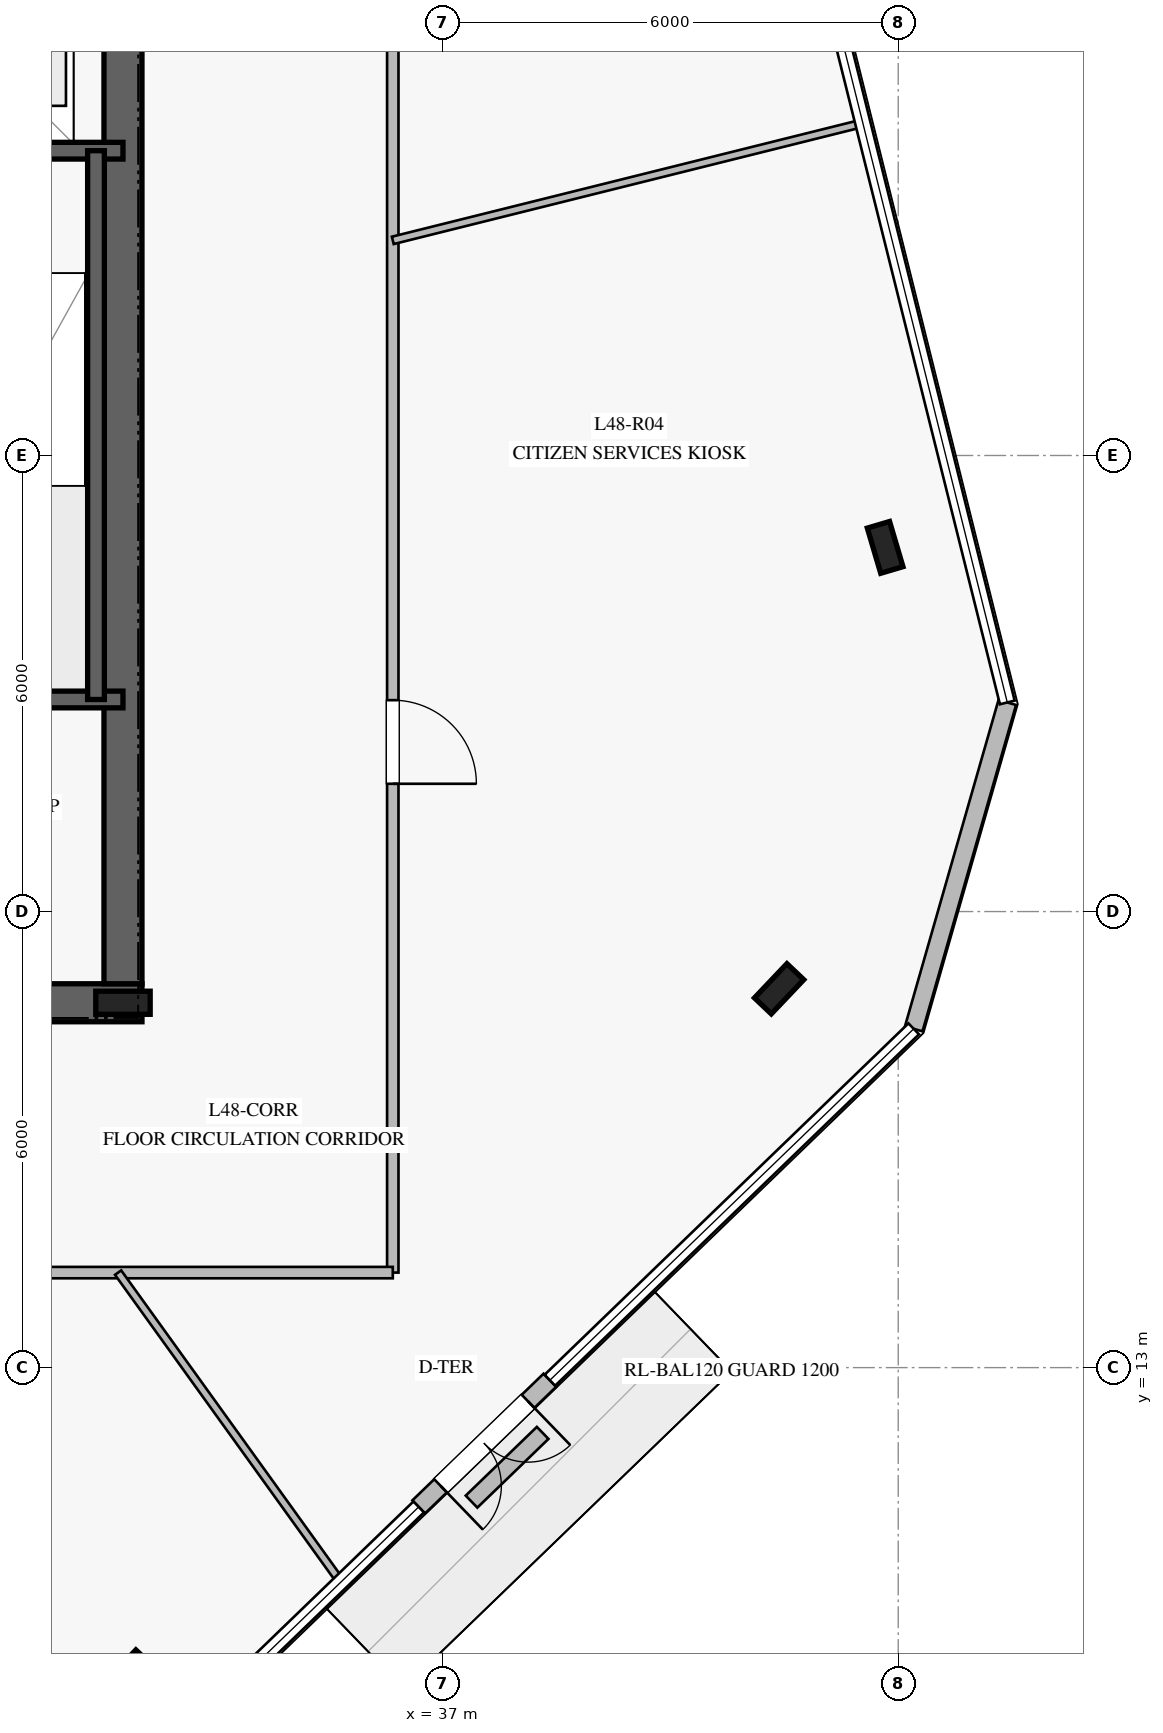
"""IFC4 building model, lengths in metres.
Left out: names, types, materials, properties, quantities, classifications, styles, units other than length and angle.
Written with IfcOpenShell. Run it as: python <this file> out.ifc"""

import sys

from ifc_helpers import new_model, si_unit, direction, frame, frame_2d, origin, origin_2d, place, context, subcontext, project, spatial, rectangle, i_section, extrude, element, fill, save


model = new_model("IFC4")
c1 = context("Model", 3, precision=1e-05, world=origin(), true_north=direction((0.0, 1.0)))
c2 = subcontext(c1, "Body", "Model", "MODEL_VIEW")
j1 = project(units=[si_unit("LENGTHUNIT", "METRE"), si_unit("PLANEANGLEUNIT", "RADIAN")], contexts=[c1])
p1 = place(None, origin())
s1 = spatial("IfcSite", under=j1, at=p1, CompositionType="ELEMENT")
p2 = place(p1, origin())
s2 = spatial("IfcBuilding", under=s1, at=p2, CompositionType="ELEMENT")
p3 = place(p2, frame((0.0, 0.0, 200.8)))
s3 = spatial("IfcBuildingStorey", under=s2, at=p3, CompositionType="ELEMENT", Elevation=200.8)
p4 = place(p3, frame((16.95, 17.8, 0.0), z_axis=(0.0, 0.0, 1.0), x_axis=(1.0, 0.0, 0.0)))
e1 = element("IfcWall", 1, at=p4, inside=s3, PredefinedType="SHEAR", context=c2, shape_type="SweptSolid", body=[
    extrude(rectangle(XDim=16.1, YDim=0.5, at=frame_2d((8.05, 0.0))), origin(), (0.0, 0.0, 1.0), 3.78),
])
p5 = place(p4, frame((5.0, 0.0, 0.0)))
e2 = element("IfcOpeningElement", 2, at=p5, cuts=e1, PredefinedType="OPENING", context=c2, shape_type="SweptSolid", body=[
    extrude(rectangle(XDim=1.2, YDim=2.25, at=frame_2d((0.6, 1.125))), frame((0.0, 0.26, 0.0), z_axis=(0.0, -1.0, 0.0), x_axis=(1.0, 0.0, 0.0)), (0.0, 0.0, 1.0), 0.52),
])
p6 = place(p4, frame((13.95, 0.0, 0.0)))
e3 = element("IfcOpeningElement", 3, at=p6, cuts=e1, PredefinedType="OPENING", context=c2, shape_type="SweptSolid", body=[
    extrude(rectangle(XDim=0.9, YDim=2.1, at=frame_2d((0.45, 1.05))), frame((0.0, 0.26, 0.0), z_axis=(0.0, -1.0, 0.0), x_axis=(1.0, 0.0, 0.0)), (0.0, 0.0, 1.0), 0.52),
])
p7 = place(p4, frame((9.825, 0.0, 0.0)))
e4 = element("IfcOpeningElement", 4, at=p7, cuts=e1, PredefinedType="OPENING", context=c2, shape_type="SweptSolid", body=[
    extrude(rectangle(XDim=1.1, YDim=2.2, at=frame_2d((0.55, 1.1))), frame((0.0, 0.26, 0.0), z_axis=(0.0, -1.0, 0.0), x_axis=(1.0, 0.0, 0.0)), (0.0, 0.0, 1.0), 0.52),
])
p8 = place(p3, frame((32.8, 18.05, 0.0), z_axis=(0.0, 0.0, 1.0), x_axis=(0.0, 1.0, 0.0)))
e5 = element("IfcWall", 5, at=p8, inside=s3, PredefinedType="SHEAR", context=c2, shape_type="SweptSolid", body=[
    extrude(rectangle(XDim=13.9, YDim=0.5, at=frame_2d((6.95, 0.0))), origin(), (0.0, 0.0, 1.0), 3.78),
])
p9 = place(p3, frame((32.8, 17.8, 0.0), z_axis=(0.0, 0.0, 1.0), x_axis=(1.0, 0.0, 0.0)))
e6 = element("IfcColumn", 6, at=p9, inside=s3, PredefinedType="COLUMN", context=c2, shape_type="SweptSolid", body=[
    extrude(i_section(OverallWidth=0.304, OverallDepth=0.716, WebThickness=0.021, FlangeThickness=0.04, at=origin_2d()), origin(), (0.0, 0.0, 1.0), 4.0),
])
for number, where, z_axis, x_axis in (
    (7, (29.08, 21.79, 0.0), (0.0, 0.0, 1.0), (1.0, 0.0, 0.0)),
    (8, (29.08, 29.01, 0.0), (0.0, 0.0, 1.0), (1.0, 0.0, 0.0)),
):
    element("IfcWall", number, at=place(p3, frame(where, z_axis=z_axis, x_axis=x_axis)), inside=s3, PredefinedType="SOLIDWALL", context=c2, shape_type="SweptSolid", body=[
        extrude(rectangle(XDim=3.72, YDim=0.22, at=frame_2d((1.86, 0.0))), origin(), (0.0, 0.0, 1.0), 3.78),
    ])
p10 = place(p3, frame((32.445, 29.01, 0.0), z_axis=(0.0, 0.0, 1.0), x_axis=(0.0, -1.0, 0.0)))
e9 = element("IfcWall", 9, at=p10, inside=s3, PredefinedType="SOLIDWALL", context=c2, shape_type="SweptSolid", body=[
    extrude(rectangle(XDim=7.22, YDim=0.22, at=frame_2d((3.61, 0.0))), origin(), (0.0, 0.0, 1.0), 3.78),
])
for number, where, z_axis, x_axis in (
    (10, (32.867, 8.956, 0.0), (0.0, 0.0, 1.0), (0.688, 0.725, 0.0)),
    (11, (41.433, 17.984, 0.0), (0.0, 0.0, 1.0), (0.688, 0.725, 0.0)),
    (12, (42.828, 23.791, 0.0), (0.0, 0.0, 1.0), (-0.284, 0.959, 0.0)),
):
    element("IfcColumn", number, at=place(p3, frame(where, z_axis=z_axis, x_axis=x_axis)), inside=s3, PredefinedType="COLUMN", context=c2, shape_type="SweptSolid", body=[
        extrude(i_section(OverallWidth=0.305, OverallDepth=0.62, WebThickness=0.021, FlangeThickness=0.04, at=origin_2d()), origin(), (0.0, 0.0, 1.0), 4.0),
    ])
p11 = place(p3, frame((36.691, 11.167, 0.0), z_axis=(0.0, 0.0, 1.0), x_axis=(0.719310294305, 0.694688923552, 0.0)))
e13 = element("IfcWall", 13, at=p11, inside=s3, PredefinedType="STANDARD", context=c2, shape_type="SweptSolid", body=[
    extrude(rectangle(XDim=2.4, YDim=0.24, at=frame_2d((1.2, 0.0))), origin(), (0.0, 0.0, 1.0), 3.78),
])
p12 = place(p11, frame((0.4, 0.0, 0.0)))
e14 = element("IfcOpeningElement", 14, at=p12, cuts=e13, PredefinedType="OPENING", context=c2, shape_type="SweptSolid", body=[
    extrude(rectangle(XDim=1.6, YDim=2.25, at=frame_2d((0.8, 1.125))), frame((0.0, 0.13, 0.0), z_axis=(0.0, -1.0, 0.0), x_axis=(1.0, 0.0, 0.0)), (0.0, 0.0, 1.0), 0.26),
])
p13 = place(p3, frame((43.204, 17.457, 0.0), z_axis=(0.0, 0.0, 1.0), x_axis=(0.275572820258, 0.961280198868, 0.0)))
e15 = element("IfcWall", 15, at=p13, inside=s3, PredefinedType="STANDARD", context=c2, shape_type="SweptSolid", body=[
    extrude(rectangle(XDim=4.467, YDim=0.24, at=frame_2d((2.233, 0.0))), origin(), (0.0, 0.0, 1.0), 3.78),
])
p14 = place(p3, frame((37.386, 11.237, 0.0), z_axis=(0.0, 0.0, 1.0), x_axis=(0.719288309138, 0.694711687204, 0.0)))
e16 = element("IfcWall", 16, at=p14, inside=s3, PredefinedType="USERDEFINED", context=c2, shape_type="SweptSolid", body=[
    extrude(rectangle(XDim=1.301, YDim=0.22, at=frame_2d((0.651, 0.0))), origin(), (0.0, 0.0, 1.0), 0.4),
])
p15 = place(p3, frame((36.35, 35.75, 0.0), z_axis=(0.0, 0.0, 1.0), x_axis=(0.0, -1.0, 0.0)))
e17 = element("IfcWall", 17, at=p15, inside=s3, PredefinedType="PARTITIONING", context=c2, shape_type="SweptSolid", body=[
    extrude(rectangle(XDim=21.5, YDim=0.15, at=frame_2d((10.75, 0.0))), origin(), (0.0, 0.0, 1.0), 3.05),
])
p16 = place(p15, frame((13.969, 0.0, 0.0)))
e18 = element("IfcOpeningElement", 18, at=p16, cuts=e17, PredefinedType="OPENING", context=c2, shape_type="SweptSolid", body=[
    extrude(rectangle(XDim=1.1, YDim=2.2, at=frame_2d((0.55, 1.1))), frame((0.0, 0.085, 0.0), z_axis=(0.0, -1.0, 0.0), x_axis=(1.0, 0.0, 0.0)), (0.0, 0.0, 1.0), 0.17),
])
p17 = place(p3, frame((36.35, 14.25, 0.0), z_axis=(0.0, 0.0, 1.0), x_axis=(-1.0, 0.0, 0.0)))
e19 = element("IfcWall", 19, at=p17, inside=s3, PredefinedType="PARTITIONING", context=c2, shape_type="SweptSolid", body=[
    extrude(rectangle(XDim=22.7, YDim=0.15, at=frame_2d((11.35, 0.0))), origin(), (0.0, 0.0, 1.0), 3.28),
])
p18 = place(p17, frame((17.843, 0.0, 0.0)))
e20 = element("IfcOpeningElement", 20, at=p18, cuts=e19, PredefinedType="OPENING", context=c2, shape_type="SweptSolid", body=[
    extrude(rectangle(XDim=1.1, YDim=2.2, at=frame_2d((0.55, 1.1))), frame((0.0, 0.085, 0.0), z_axis=(0.0, -1.0, 0.0), x_axis=(1.0, 0.0, 0.0)), (0.0, 0.0, 1.0), 0.17),
])
p19 = place(p17, frame((8.363, 0.0, 0.0)))
e21 = element("IfcOpeningElement", 21, at=p19, cuts=e19, PredefinedType="OPENING", context=c2, shape_type="SweptSolid", body=[
    extrude(rectangle(XDim=1.1, YDim=2.2, at=frame_2d((0.55, 1.1))), frame((0.0, 0.085, 0.0), z_axis=(0.0, -1.0, 0.0), x_axis=(1.0, 0.0, 0.0)), (0.0, 0.0, 1.0), 0.17),
])
p20 = place(p3, frame((32.736, 14.25, 0.0), z_axis=(0.0, 0.0, 1.0), x_axis=(0.584181233506, -0.81162324167, 0.0)))
e22 = element("IfcWall", 22, at=p20, inside=s3, PredefinedType="MOVABLE", context=c2, shape_type="SweptSolid", body=[
    extrude(rectangle(XDim=5.0, YDim=0.1, at=frame_2d((2.5, 0.0))), origin(), (0.0, 0.0, 1.0), 3.18),
])
p21 = place(p3, frame((36.35, 27.83, 0.0), z_axis=(0.0, 0.0, 1.0), x_axis=(0.970304919619, 0.241885020131, 0.0)))
e23 = element("IfcWall", 23, at=p21, inside=s3, PredefinedType="MOVABLE", context=c2, shape_type="SweptSolid", body=[
    extrude(rectangle(XDim=6.358, YDim=0.1, at=frame_2d((3.179, 0.0))), origin(), (0.0, 0.0, 1.0), 3.05),
])
p22 = place(p12, frame((1.6, 0.0, 0.0), z_axis=(0.0, 0.0, 1.0), x_axis=(-1.0, 0.0, 0.0)))
e24 = element("IfcDoor", 24, at=p22, inside=s3, OperationType="DOUBLE_DOOR_SINGLE_SWING", PredefinedType="DOOR", context=c2, shape_type="SweptSolid", body=[
    extrude(rectangle(XDim=1.6, YDim=2.25, at=frame_2d((0.8, 1.125))), frame((0.0, 0.025, 0.0), z_axis=(0.0, -1.0, 0.0), x_axis=(1.0, 0.0, 0.0)), (0.0, 0.0, 1.0), 0.05),
])
fill(e14, e24)
p23 = place(p16, origin())
e25 = element("IfcDoor", 25, at=p23, inside=s3, OperationType="SINGLE_SWING_RIGHT", PredefinedType="DOOR", context=c2, shape_type="SweptSolid", body=[
    extrude(rectangle(XDim=1.1, YDim=2.2, at=frame_2d((0.55, 1.1))), frame((0.0, 0.025, 0.0), z_axis=(0.0, -1.0, 0.0), x_axis=(1.0, 0.0, 0.0)), (0.0, 0.0, 1.0), 0.05),
])
fill(e18, e25)
save(model, sys.argv[1])
